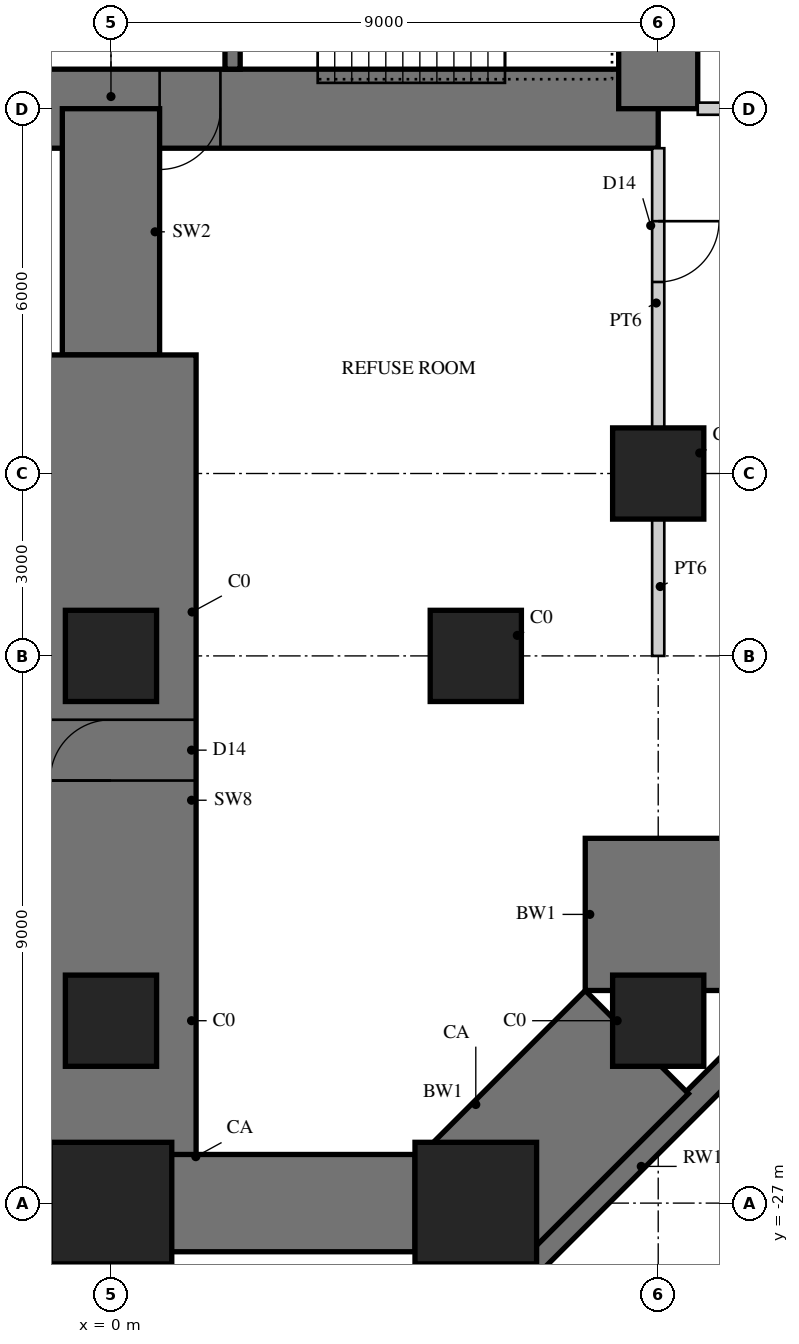
"""IFC4 building model, lengths in metres.
Left out: names, types, materials, properties, quantities, classifications, styles, units other than length and angle.
Written with IfcOpenShell. Run it as: python <this file> out.ifc"""

import sys

from ifc_helpers import new_model, si_unit, direction, frame, frame_2d, origin, origin_2d, place, context, subcontext, project, spatial, polyline, rectangle, outline, extrude, element, fill, save


model = new_model("IFC4")
c1 = context("Model", 3, precision=1e-05, world=origin(), true_north=direction((0.0, 1.0)))
c2 = subcontext(c1, "Body", "Model", "MODEL_VIEW")
j1 = project(units=[si_unit("LENGTHUNIT", "METRE"), si_unit("PLANEANGLEUNIT", "RADIAN")], contexts=[c1])
p1 = place(None, origin())
s1 = spatial("IfcSite", under=j1, at=p1, CompositionType="ELEMENT")
p2 = place(p1, origin())
s2 = spatial("IfcBuilding", under=s1, at=p2, CompositionType="ELEMENT")
p3 = place(p2, frame((0.0, 0.0, -4.0)))
s3 = spatial("IfcBuildingStorey", under=s2, at=p3, CompositionType="ELEMENT", Elevation=-4.0)
p4 = place(p3, origin())
e1 = element("IfcWall", 1, at=p4, inside=s3, PredefinedType="SOLIDWALL", context=c2, shape_type="SweptSolid", body=[
    extrude(outline(polyline([(10.15, -24.476), (10.55, -24.642), (6.642, -28.55), (6.476, -28.15), (10.15, -24.476)])), origin(), (0.0, 0.0, 1.0), 4.0),
])
p5 = place(p3, frame((-9.0, -9.0, 0.0), z_axis=(0.0, 0.0, 1.0), x_axis=(1.0, 0.0, 0.0)))
e2 = element("IfcWall", 2, at=p5, inside=s3, PredefinedType="SHEAR", context=c2, shape_type="SweptSolid", body=[
    extrude(rectangle(XDim=18.0, YDim=1.3, at=frame_2d((9.0, 0.0))), origin(), (0.0, 0.0, 1.0), 4.0),
])
p6 = place(p5, frame((9.8, 0.0, 0.0)))
e3 = element("IfcOpeningElement", 3, at=p6, cuts=e2, PredefinedType="OPENING", context=c2, shape_type="SweptSolid", body=[
    extrude(rectangle(XDim=1.0, YDim=2.4, at=frame_2d((0.5, 1.2))), frame((0.0, 0.66, 0.0), z_axis=(0.0, -1.0, 0.0), x_axis=(1.0, 0.0, 0.0)), (0.0, 0.0, 1.0), 1.32),
])
p7 = place(p3, frame((9.0, -9.0, 0.0), z_axis=(0.0, 0.0, 1.0), x_axis=(0.0, 1.0, 0.0)))
e4 = element("IfcWall", 4, at=p7, inside=s3, PredefinedType="SHEAR", context=c2, shape_type="SweptSolid", body=[
    extrude(rectangle(XDim=18.0, YDim=1.3, at=frame_2d((9.0, 0.0))), origin(), (0.0, 0.0, 1.0), 4.0),
])
p8 = place(p7, frame((9.8, 0.0, 0.0)))
e5 = element("IfcOpeningElement", 5, at=p8, cuts=e4, PredefinedType="OPENING", context=c2, shape_type="SweptSolid", body=[
    extrude(rectangle(XDim=1.0, YDim=2.4, at=frame_2d((0.5, 1.2))), frame((0.0, 0.66, 0.0), z_axis=(0.0, -1.0, 0.0), x_axis=(1.0, 0.0, 0.0)), (0.0, 0.0, 1.0), 1.32),
])
p9 = place(p3, frame((2.0, -1.675, 0.0), z_axis=(0.0, 0.0, 1.0), x_axis=(0.0, -1.0, 0.0)))
e6 = element("IfcWall", 6, at=p9, inside=s3, PredefinedType="SHEAR", context=c2, shape_type="SweptSolid", body=[
    extrude(rectangle(XDim=6.675, YDim=0.25, at=frame_2d((3.337, 0.0))), origin(), (0.0, 0.0, 1.0), 4.0),
])
p10 = place(p9, frame((0.725, 0.0, 0.0)))
e7 = element("IfcOpeningElement", 7, at=p10, cuts=e6, PredefinedType="OPENING", context=c2, shape_type="SweptSolid", body=[
    extrude(rectangle(XDim=1.0, YDim=2.1, at=frame_2d((0.5, 1.05))), frame((0.0, 0.135, 0.0), z_axis=(0.0, -1.0, 0.0), x_axis=(1.0, 0.0, 0.0)), (0.0, 0.0, 1.0), 0.27),
])
p11 = place(p3, frame((0.0, -9.0, 0.0), z_axis=(0.0, 0.0, 1.0), x_axis=(0.0, -1.0, 0.0)))
e8 = element("IfcWall", 8, at=p11, inside=s3, PredefinedType="SHEAR", context=c2, shape_type="SweptSolid", body=[
    extrude(rectangle(XDim=4.05, YDim=1.6, at=frame_2d((2.025, 0.0))), origin(), (0.0, 0.0, 1.0), 4.0),
])
p12 = place(p3, frame((0.0, -13.05, 0.0), z_axis=(0.0, 0.0, 1.0), x_axis=(0.0, -1.0, 0.0)))
e9 = element("IfcWall", 9, at=p12, inside=s3, PredefinedType="SHEAR", context=c2, shape_type="SweptSolid", body=[
    extrude(rectangle(XDim=13.95, YDim=2.8, at=frame_2d((6.975, 0.0))), origin(), (0.0, 0.0, 1.0), 4.0),
])
p13 = place(p12, frame((6.0, 0.0, 0.0)))
e10 = element("IfcOpeningElement", 10, at=p13, cuts=e9, PredefinedType="OPENING", context=c2, shape_type="SweptSolid", body=[
    extrude(rectangle(XDim=1.0, YDim=2.2, at=frame_2d((0.5, 1.1))), frame((0.0, 1.41, 0.0), z_axis=(0.0, -1.0, 0.0), x_axis=(1.0, 0.0, 0.0)), (0.0, 0.0, 1.0), 2.82),
])
p14 = place(p3, frame((9.0, -21.0, 0.0), z_axis=(0.0, 0.0, 1.0), x_axis=(0.0, -1.0, 0.0)))
e11 = element("IfcWall", 11, at=p14, inside=s3, PredefinedType="SHEAR", context=c2, shape_type="SweptSolid", body=[
    extrude(rectangle(XDim=2.503, YDim=2.4, at=frame_2d((1.251, 0.0))), origin(), (0.0, 0.0, 1.0), 4.0),
])
p15 = place(p3, frame((8.648, -24.352, 0.0), z_axis=(0.0, 0.0, 1.0), x_axis=(-0.707106781187, -0.707106781187, 0.0)))
e12 = element("IfcWall", 12, at=p15, inside=s3, PredefinedType="SHEAR", context=c2, shape_type="SweptSolid", body=[
    extrude(rectangle(XDim=3.745, YDim=2.4, at=frame_2d((1.873, 0.0))), origin(), (0.0, 0.0, 1.0), 4.0),
])
p16 = place(p3, frame((-5.0, -27.0, 0.0), z_axis=(0.0, 0.0, 1.0), x_axis=(1.0, 0.0, 0.0)))
e13 = element("IfcWall", 13, at=p16, inside=s3, PredefinedType="SHEAR", context=c2, shape_type="SweptSolid", body=[
    extrude(rectangle(XDim=10.0, YDim=1.6, at=frame_2d((5.0, 0.0))), origin(), (0.0, 0.0, 1.0), 4.0),
])
for number, where, z_axis, x_axis in (
    (14, (9.0, -15.0, 0.0), (0.0, 0.0, 1.0), (1.0, 0.0, 0.0)),
    (15, (9.0, -24.0, 0.0), (0.0, 0.0, 1.0), (1.0, 0.0, 0.0)),
):
    element("IfcColumn", number, at=place(p3, frame(where, z_axis=z_axis, x_axis=x_axis)), inside=s3, PredefinedType="COLUMN", context=c2, shape_type="SweptSolid", body=[
        extrude(rectangle(XDim=1.5, YDim=1.5, at=origin_2d()), origin(), (0.0, 0.0, 1.0), 4.0),
    ])
for number, where, z_axis, x_axis in (
    (16, (0.0, -27.0, 0.0), (0.0, 0.0, 1.0), (1.0, 0.0, 0.0)),
    (17, (6.0, -27.0, 0.0), (0.0, 0.0, 1.0), (1.0, 0.0, 0.0)),
):
    element("IfcColumn", number, at=place(p3, frame(where, z_axis=z_axis, x_axis=x_axis)), inside=s3, PredefinedType="COLUMN", context=c2, shape_type="SweptSolid", body=[
        extrude(rectangle(XDim=2.0, YDim=2.0, at=origin_2d()), origin(), (0.0, 0.0, 1.0), 4.0),
    ])
for number, where, z_axis, x_axis in (
    (18, (0.0, -18.0, 0.0), (0.0, 0.0, 1.0), (1.0, 0.0, 0.0)),
    (19, (6.0, -18.0, 0.0), (0.0, 0.0, 1.0), (1.0, 0.0, 0.0)),
    (20, (0.0, -24.0, 0.0), (0.0, 0.0, 1.0), (1.0, 0.0, 0.0)),
):
    element("IfcColumn", number, at=place(p3, frame(where, z_axis=z_axis, x_axis=x_axis)), inside=s3, PredefinedType="COLUMN", context=c2, shape_type="SweptSolid", body=[
        extrude(rectangle(XDim=1.5, YDim=1.5, at=origin_2d()), origin(), (0.0, 0.0, 1.0), 4.0),
    ])
p17 = place(p3, frame((9.0, -9.65, 0.0), z_axis=(0.0, 0.0, 1.0), x_axis=(0.0, -1.0, 0.0)))
e21 = element("IfcWall", 21, at=p17, inside=s3, PredefinedType="SOLIDWALL", context=c2, shape_type="SweptSolid", body=[
    extrude(rectangle(XDim=4.6, YDim=0.2, at=frame_2d((2.3, 0.0))), origin(), (0.0, 0.0, 1.0), 2.7),
])
p18 = place(p17, frame((1.2, 0.0, 0.0)))
e22 = element("IfcOpeningElement", 22, at=p18, cuts=e21, PredefinedType="OPENING", context=c2, shape_type="SweptSolid", body=[
    extrude(rectangle(XDim=1.0, YDim=2.2, at=frame_2d((0.5, 1.1))), frame((0.0, 0.11, 0.0), z_axis=(0.0, -1.0, 0.0), x_axis=(1.0, 0.0, 0.0)), (0.0, 0.0, 1.0), 0.22),
])
p19 = place(p3, frame((9.0, -15.75, 0.0), z_axis=(0.0, 0.0, 1.0), x_axis=(0.0, -1.0, 0.0)))
e23 = element("IfcWall", 23, at=p19, inside=s3, PredefinedType="SOLIDWALL", context=c2, shape_type="SweptSolid", body=[
    extrude(rectangle(XDim=2.25, YDim=0.2, at=frame_2d((1.125, 0.0))), origin(), (0.0, 0.0, 1.0), 2.7),
])
p20 = place(p3, frame((14.25, -9.0, 0.0), z_axis=(0.0, 0.0, 1.0), x_axis=(-1.0, 0.0, 0.0)))
e24 = element("IfcWall", 24, at=p20, inside=s3, PredefinedType="SOLIDWALL", context=c2, shape_type="SweptSolid", body=[
    extrude(rectangle(XDim=4.6, YDim=0.2, at=frame_2d((2.3, 0.0))), origin(), (0.0, 0.0, 1.0), 2.7),
])
p21 = place(p18, origin())
e25 = element("IfcDoor", 25, at=p21, inside=s3, OperationType="SINGLE_SWING_LEFT", PredefinedType="DOOR", context=c2, shape_type="SweptSolid", body=[
    extrude(rectangle(XDim=1.0, YDim=2.2, at=frame_2d((0.5, 1.1))), frame((0.0, 0.025, 0.0), z_axis=(0.0, -1.0, 0.0), x_axis=(1.0, 0.0, 0.0)), (0.0, 0.0, 1.0), 0.05),
])
fill(e22, e25)
p22 = place(p13, frame((1.0, 0.0, 0.0), z_axis=(0.0, 0.0, 1.0), x_axis=(-1.0, 0.0, 0.0)))
e26 = element("IfcDoor", 26, at=p22, inside=s3, OperationType="SINGLE_SWING_LEFT", PredefinedType="DOOR", context=c2, shape_type="SweptSolid", body=[
    extrude(rectangle(XDim=1.0, YDim=2.2, at=frame_2d((0.5, 1.1))), frame((0.0, 0.025, 0.0), z_axis=(0.0, -1.0, 0.0), x_axis=(1.0, 0.0, 0.0)), (0.0, 0.0, 1.0), 0.05),
])
fill(e10, e26)
p23 = place(p6, frame((1.0, 0.0, 0.0), z_axis=(0.0, 0.0, 1.0), x_axis=(-1.0, 0.0, 0.0)))
e27 = element("IfcDoor", 27, at=p23, inside=s3, OperationType="SINGLE_SWING_RIGHT", PredefinedType="DOOR", context=c2, shape_type="SweptSolid", body=[
    extrude(rectangle(XDim=1.0, YDim=2.4, at=frame_2d((0.5, 1.2))), frame((0.0, -0.005, 0.0), z_axis=(0.0, -1.0, 0.0), x_axis=(1.0, 0.0, 0.0)), (0.0, 0.0, 1.0), 0.05),
])
fill(e3, e27)
save(model, sys.argv[1])
